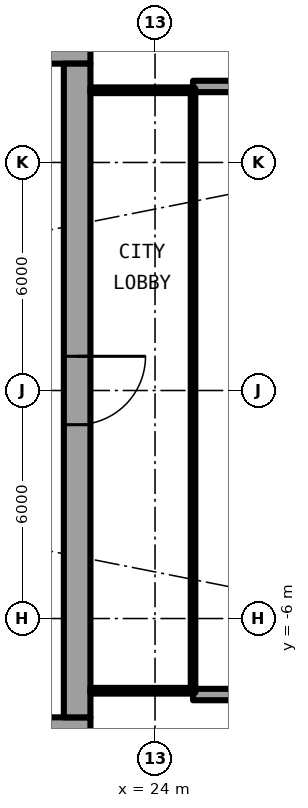
"""IFC4 building model, lengths in metres.
Left out: names, types, materials, properties, quantities, classifications, styles, units other than length and angle.
Written with IfcOpenShell. Run it as: python <this file> out.ifc"""

import sys

from ifc_helpers import new_model, si_unit, direction, frame, frame_2d, origin, place, context, subcontext, project, spatial, rectangle, extrude, element, fill, save


model = new_model("IFC4")
c1 = context("Model", 3, precision=1e-05, world=origin(), true_north=direction((0.0, 1.0)))
c2 = subcontext(c1, "Body", "Model", "MODEL_VIEW")
j1 = project(units=[si_unit("LENGTHUNIT", "METRE"), si_unit("PLANEANGLEUNIT", "RADIAN")], contexts=[c1])
p1 = place(None, origin())
s1 = spatial("IfcSite", under=j1, at=p1, CompositionType="ELEMENT")
p2 = place(p1, origin())
s2 = spatial("IfcBuilding", under=s1, at=p2, CompositionType="ELEMENT")
p3 = place(p2, frame((0.0, 0.0, 81.9)))
s3 = spatial("IfcBuildingStorey", under=s2, at=p3, CompositionType="ELEMENT", Elevation=81.9)
for number, where, z_axis, x_axis in (
    (1, (25.0, 8.0, 0.0), (0.0, 0.0, 1.0), (1.0, 0.0, 0.0)),
    (2, (25.0, -8.0, 0.0), (0.0, 0.0, 1.0), (1.0, 0.0, 0.0)),
):
    element("IfcWall", number, at=place(p3, frame(where, z_axis=z_axis, x_axis=x_axis)), inside=s3, PredefinedType="SOLIDWALL", context=c2, shape_type="SweptSolid", body=[
        extrude(rectangle(XDim=2.667, YDim=0.3, at=frame_2d((1.333, 0.0))), origin(), (0.0, 0.0, 1.0), 2.7),
    ])
p4 = place(p3, frame((22.3, 8.95, 0.0), z_axis=(0.0, 0.0, 1.0), x_axis=(-1.0, 0.0, 0.0)))
e3 = element("IfcWall", 3, at=p4, inside=s3, PredefinedType="SHEAR", context=c2, shape_type="SweptSolid", body=[
    extrude(rectangle(XDim=14.0, YDim=0.7, at=frame_2d((7.0, 0.0))), origin(), (0.0, 0.0, 1.0), 3.05),
])
p5 = place(p4, frame((1.225, 0.0, 0.0)))
e4 = element("IfcOpeningElement", 4, at=p5, cuts=e3, PredefinedType="OPENING", context=c2, shape_type="SweptSolid", body=[
    extrude(rectangle(XDim=1.2, YDim=2.3, at=frame_2d((0.6, 1.15))), frame((0.0, 0.36, 0.0), z_axis=(0.0, -1.0, 0.0), x_axis=(1.0, 0.0, 0.0)), (0.0, 0.0, 1.0), 0.72),
])
p6 = place(p3, frame((8.3, -8.95, 0.0), z_axis=(0.0, 0.0, 1.0), x_axis=(1.0, 0.0, 0.0)))
e5 = element("IfcWall", 5, at=p6, inside=s3, PredefinedType="SHEAR", context=c2, shape_type="SweptSolid", body=[
    extrude(rectangle(XDim=14.0, YDim=0.7, at=frame_2d((7.0, 0.0))), origin(), (0.0, 0.0, 1.0), 3.05),
])
p7 = place(p6, frame((11.575, 0.0, 0.0)))
e6 = element("IfcOpeningElement", 6, at=p7, cuts=e5, PredefinedType="OPENING", context=c2, shape_type="SweptSolid", body=[
    extrude(rectangle(XDim=1.2, YDim=2.3, at=frame_2d((0.6, 1.15))), frame((0.0, 0.36, 0.0), z_axis=(0.0, -1.0, 0.0), x_axis=(1.0, 0.0, 0.0)), (0.0, 0.0, 1.0), 0.72),
])
p8 = place(p3, frame((21.95, 8.6, 0.0), z_axis=(0.0, 0.0, 1.0), x_axis=(0.0, -1.0, 0.0)))
e7 = element("IfcWall", 7, at=p8, inside=s3, PredefinedType="SHEAR", context=c2, shape_type="SweptSolid", body=[
    extrude(rectangle(XDim=17.2, YDim=0.7, at=frame_2d((8.6, 0.0))), origin(), (0.0, 0.0, 1.0), 3.05),
])
p9 = place(p8, frame((7.7, 0.0, 0.0)))
e8 = element("IfcOpeningElement", 8, at=p9, cuts=e7, PredefinedType="OPENING", context=c2, shape_type="SweptSolid", body=[
    extrude(rectangle(XDim=1.8, YDim=2.3, at=frame_2d((0.9, 1.15))), frame((0.0, 0.36, 0.0), z_axis=(0.0, -1.0, 0.0), x_axis=(1.0, 0.0, 0.0)), (0.0, 0.0, 1.0), 0.72),
])
for number, where, z_axis, x_axis in (
    (9, (22.3, -7.9, 0.0), (0.0, 0.0, 1.0), (1.0, 0.0, 0.0)),
    (10, (22.3, 7.9, 0.0), (0.0, 0.0, 1.0), (1.0, 0.0, 0.0)),
):
    element("IfcWall", number, at=place(p3, frame(where, z_axis=z_axis, x_axis=x_axis)), inside=s3, PredefinedType="PARTITIONING", context=c2, shape_type="SweptSolid", body=[
        extrude(rectangle(XDim=2.64, YDim=0.15, at=frame_2d((1.32, 0.0))), origin(), (0.0, 0.0, 1.0), 2.7),
    ])
p10 = place(p3, frame((25.0, -7.95, 0.0), z_axis=(0.0, 0.0, 1.0), x_axis=(0.0, 1.0, 0.0)))
e11 = element("IfcWall", 11, at=p10, inside=s3, PredefinedType="PARTITIONING", context=c2, shape_type="SweptSolid", body=[
    extrude(rectangle(XDim=15.9, YDim=0.12, at=frame_2d((7.95, 0.0))), origin(), (0.0, 0.0, 1.0), 2.7),
])
p11 = place(p10, frame((0.95, 0.0, 0.1)))
e12 = element("IfcOpeningElement", 12, at=p11, cuts=e11, PredefinedType="OPENING", context=c2, shape_type="SweptSolid", body=[
    extrude(rectangle(XDim=14.0, YDim=2.35, at=frame_2d((7.0, 1.175))), frame((0.0, 0.07, 0.0), z_axis=(0.0, -1.0, 0.0), x_axis=(1.0, 0.0, 0.0)), (0.0, 0.0, 1.0), 0.14),
])
p12 = place(p9, origin())
e13 = element("IfcDoor", 13, at=p12, inside=s3, OperationType="SINGLE_SWING_LEFT", PredefinedType="DOOR", context=c2, shape_type="SweptSolid", body=[
    extrude(rectangle(XDim=1.8, YDim=2.3, at=frame_2d((0.9, 1.15))), frame((0.0, 0.025, 0.0), z_axis=(0.0, -1.0, 0.0), x_axis=(1.0, 0.0, 0.0)), (0.0, 0.0, 1.0), 0.05),
])
fill(e8, e13)
p13 = place(p11, origin())
e14 = element("IfcWindow", 14, at=p13, inside=s3, PartitioningType="SINGLE_PANEL", PredefinedType="WINDOW", context=c2, shape_type="SweptSolid", body=[
    extrude(rectangle(XDim=14.0, YDim=2.35, at=frame_2d((7.0, 1.175))), frame((0.0, 0.03, 0.0), z_axis=(0.0, -1.0, 0.0), x_axis=(1.0, 0.0, 0.0)), (0.0, 0.0, 1.0), 0.06),
])
fill(e12, e14)
save(model, sys.argv[1])
